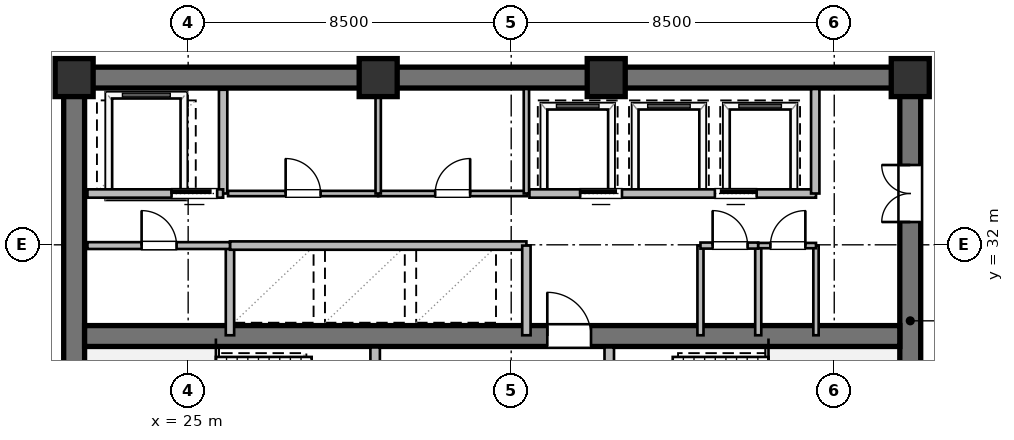
"""IFC4 building model, lengths in metres.
Left out: names, types, materials, properties, quantities, classifications, styles, units other than length and angle.
Written with IfcOpenShell. Run it as: python <this file> out.ifc"""

import sys

from ifc_helpers import new_model, si_unit, direction, frame, frame_2d, origin, origin_2d, place, context, subcontext, project, spatial, rectangle, extrude, element, fill, save


model = new_model("IFC4")
c1 = context("Model", 3, precision=1e-05, world=origin(), true_north=direction((0.0, 1.0)))
c2 = subcontext(c1, "Body", "Model", "MODEL_VIEW")
j1 = project(units=[si_unit("LENGTHUNIT", "METRE"), si_unit("PLANEANGLEUNIT", "RADIAN")], contexts=[c1])
p1 = place(None, origin())
s1 = spatial("IfcSite", under=j1, at=p1, CompositionType="ELEMENT")
p2 = place(p1, origin())
s2 = spatial("IfcBuilding", under=s1, at=p2, CompositionType="ELEMENT")
p3 = place(p2, frame((0.0, 0.0, 163.8)))
s3 = spatial("IfcBuildingStorey", under=s2, at=p3, CompositionType="ELEMENT", Elevation=163.8)
p4 = place(p3, frame((21.725, 36.4, 0.0), z_axis=(0.0, 0.0, 1.0), x_axis=(1.0, 0.0, 0.0)))
e1 = element("IfcWall", 1, at=p4, inside=s3, PredefinedType="SHEAR", context=c2, shape_type="SweptSolid", body=[
    extrude(rectangle(XDim=22.55, YDim=0.55, at=frame_2d((11.275, 0.0))), origin(), (0.0, 0.0, 1.0), 3.36),
])
p5 = place(p3, frame((22.0, 23.875, 0.0), z_axis=(0.0, 0.0, 1.0), x_axis=(0.0, 1.0, 0.0)))
e2 = element("IfcWall", 2, at=p5, inside=s3, PredefinedType="SHEAR", context=c2, shape_type="SweptSolid", body=[
    extrude(rectangle(XDim=12.25, YDim=0.55, at=frame_2d((6.125, 0.0))), origin(), (0.0, 0.0, 1.0), 3.36),
])
p6 = place(p3, frame((44.0, 23.875, 0.0), z_axis=(0.0, 0.0, 1.0), x_axis=(0.0, 1.0, 0.0)))
e3 = element("IfcWall", 3, at=p6, inside=s3, PredefinedType="SHEAR", context=c2, shape_type="SweptSolid", body=[
    extrude(rectangle(XDim=12.25, YDim=0.55, at=frame_2d((6.125, 0.0))), origin(), (0.0, 0.0, 1.0), 3.36),
])
p7 = place(p6, frame((8.725, 0.0, 0.0)))
e4 = element("IfcOpeningElement", 4, at=p7, cuts=e3, PredefinedType="OPENING", context=c2, shape_type="SweptSolid", body=[
    extrude(rectangle(XDim=1.5, YDim=2.15, at=frame_2d((0.75, 1.075))), frame((0.0, 0.285, 0.0), z_axis=(0.0, -1.0, 0.0), x_axis=(1.0, 0.0, 0.0)), (0.0, 0.0, 1.0), 0.57),
])
p8 = place(p3, frame((22.275, 29.6, 0.0), z_axis=(0.0, 0.0, 1.0), x_axis=(1.0, 0.0, 0.0)))
e5 = element("IfcWall", 5, at=p8, inside=s3, PredefinedType="SHEAR", context=c2, shape_type="SweptSolid", body=[
    extrude(rectangle(XDim=21.45, YDim=0.55, at=frame_2d((10.725, 0.0))), origin(), (0.0, 0.0, 1.0), 3.36),
])
p9 = place(p8, frame((12.175, 0.0, 0.0)))
e6 = element("IfcOpeningElement", 6, at=p9, cuts=e5, PredefinedType="OPENING", context=c2, shape_type="SweptSolid", body=[
    extrude(rectangle(XDim=1.15, YDim=2.1, at=frame_2d((0.575, 1.05))), frame((0.0, 0.285, 0.0), z_axis=(0.0, -1.0, 0.0), x_axis=(1.0, 0.0, 0.0)), (0.0, 0.0, 1.0), 0.57),
])
for number, where, z_axis, x_axis in (
    (7, (44.0, 36.4, 0.0), (0.0, 0.0, 1.0), (1.0, 0.0, 0.0)),
    (8, (36.0, 36.4, 0.0), (0.0, 0.0, 1.0), (1.0, 0.0, 0.0)),
    (9, (30.0, 36.4, 0.0), (0.0, 0.0, 1.0), (1.0, 0.0, 0.0)),
    (10, (22.0, 36.4, 0.0), (0.0, 0.0, 1.0), (1.0, 0.0, 0.0)),
):
    element("IfcColumn", number, at=place(p3, frame(where, z_axis=z_axis, x_axis=x_axis)), inside=s3, PredefinedType="COLUMN", context=c2, shape_type="SweptSolid", body=[
        extrude(rectangle(XDim=1.0, YDim=1.0, at=origin_2d()), origin(), (0.0, 0.0, 1.0), 3.6),
    ])
p10 = place(p3, frame((29.92, 23.9, 0.0), z_axis=(0.0, 0.0, 1.0), x_axis=(0.0, 1.0, 0.0)))
e11 = element("IfcWall", 11, at=p10, inside=s3, PredefinedType="SOLIDWALL", context=c2, shape_type="SweptSolid", body=[
    extrude(rectangle(XDim=5.4, YDim=0.25, at=frame_2d((2.7, 0.0))), origin(), (0.0, 0.0, 1.0), 2.89),
])
p11 = place(p10, frame((3.421, 0.0, 0.0)))
e12 = element("IfcOpeningElement", 12, at=p11, cuts=e11, PredefinedType="OPENING", context=c2, shape_type="SweptSolid", body=[
    extrude(rectangle(XDim=1.15, YDim=2.1, at=frame_2d((0.575, 1.05))), frame((0.0, 0.135, 0.0), z_axis=(0.0, -1.0, 0.0), x_axis=(1.0, 0.0, 0.0)), (0.0, 0.0, 1.0), 0.27),
])
p12 = place(p3, frame((36.08, 23.9, 0.0), z_axis=(0.0, 0.0, 1.0), x_axis=(0.0, 1.0, 0.0)))
e13 = element("IfcWall", 13, at=p12, inside=s3, PredefinedType="SOLIDWALL", context=c2, shape_type="SweptSolid", body=[
    extrude(rectangle(XDim=5.4, YDim=0.25, at=frame_2d((2.7, 0.0))), origin(), (0.0, 0.0, 1.0), 3.36),
])
p13 = place(p12, frame((3.421, 0.0, 0.0)))
e14 = element("IfcOpeningElement", 14, at=p13, cuts=e13, PredefinedType="OPENING", context=c2, shape_type="SweptSolid", body=[
    extrude(rectangle(XDim=1.15, YDim=2.1, at=frame_2d((0.575, 1.05))), frame((0.0, 0.135, 0.0), z_axis=(0.0, -1.0, 0.0), x_axis=(1.0, 0.0, 0.0)), (0.0, 0.0, 1.0), 0.27),
])
p14 = place(p3, frame((25.92, 33.35, 0.0), z_axis=(0.0, 0.0, 1.0), x_axis=(0.0, 1.0, 0.0)))
e15 = element("IfcWall", 15, at=p14, inside=s3, PredefinedType="SOLIDWALL", context=c2, shape_type="SweptSolid", body=[
    extrude(rectangle(XDim=2.73, YDim=0.22, at=frame_2d((1.365, 0.0))), origin(), (0.0, 0.0, 1.0), 3.36),
])
p15 = place(p3, frame((22.35, 33.35, 0.0), z_axis=(0.0, 0.0, 1.0), x_axis=(1.0, 0.0, 0.0)))
e16 = element("IfcWall", 16, at=p15, inside=s3, PredefinedType="SOLIDWALL", context=c2, shape_type="SweptSolid", body=[
    extrude(rectangle(XDim=3.57, YDim=0.22, at=frame_2d((1.785, 0.0))), origin(), (0.0, 0.0, 1.0), 3.36),
])
p16 = place(p15, frame((2.213, 0.0, 0.0)))
e17 = element("IfcOpeningElement", 17, at=p16, cuts=e16, PredefinedType="OPENING", context=c2, shape_type="SweptSolid", body=[
    extrude(rectangle(XDim=1.2, YDim=2.1, at=frame_2d((0.6, 1.05))), frame((0.0, 0.12, 0.0), z_axis=(0.0, -1.0, 0.0), x_axis=(1.0, 0.0, 0.0)), (0.0, 0.0, 1.0), 0.24),
])
p17 = place(p3, frame((26.1, 29.62, 0.0), z_axis=(0.0, 0.0, 1.0), x_axis=(0.0, 1.0, 0.0)))
e18 = element("IfcWall", 18, at=p17, inside=s3, PredefinedType="SOLIDWALL", context=c2, shape_type="SweptSolid", body=[
    extrude(rectangle(XDim=2.36, YDim=0.22, at=frame_2d((1.18, 0.0))), origin(), (0.0, 0.0, 1.0), 3.36),
])
p18 = place(p3, frame((26.1, 31.98, 0.0), z_axis=(0.0, 0.0, 1.0), x_axis=(1.0, 0.0, 0.0)))
e19 = element("IfcWall", 19, at=p18, inside=s3, PredefinedType="SOLIDWALL", context=c2, shape_type="SweptSolid", body=[
    extrude(rectangle(XDim=7.8, YDim=0.22, at=frame_2d((3.9, 0.0))), origin(), (0.0, 0.0, 1.0), 3.36),
])
p19 = place(p3, frame((33.9, 29.62, 0.0), z_axis=(0.0, 0.0, 1.0), x_axis=(0.0, 1.0, 0.0)))
e20 = element("IfcWall", 20, at=p19, inside=s3, PredefinedType="SOLIDWALL", context=c2, shape_type="SweptSolid", body=[
    extrude(rectangle(XDim=2.36, YDim=0.22, at=frame_2d((1.18, 0.0))), origin(), (0.0, 0.0, 1.0), 3.36),
])
p20 = place(p3, frame((26.05, 33.35, 0.0), z_axis=(0.0, 0.0, 1.0), x_axis=(1.0, 0.0, 0.0)))
e21 = element("IfcWall", 21, at=p20, inside=s3, PredefinedType="PARTITIONING", context=c2, shape_type="SweptSolid", body=[
    extrude(rectangle(XDim=3.95, YDim=0.14, at=frame_2d((1.975, 0.0))), origin(), (0.0, 0.0, 1.0), 3.36),
])
p21 = place(p20, frame((1.515, 0.0, 0.0)))
e22 = element("IfcOpeningElement", 22, at=p21, cuts=e21, PredefinedType="OPENING", context=c2, shape_type="SweptSolid", body=[
    extrude(rectangle(XDim=0.92, YDim=2.1, at=frame_2d((0.46, 1.05))), frame((0.0, 0.08, 0.0), z_axis=(0.0, -1.0, 0.0), x_axis=(1.0, 0.0, 0.0)), (0.0, 0.0, 1.0), 0.16),
])
p22 = place(p3, frame((30.0, 33.35, 0.0), z_axis=(0.0, 0.0, 1.0), x_axis=(1.0, 0.0, 0.0)))
e23 = element("IfcWall", 23, at=p22, inside=s3, PredefinedType="PARTITIONING", context=c2, shape_type="SweptSolid", body=[
    extrude(rectangle(XDim=3.92, YDim=0.14, at=frame_2d((1.96, 0.0))), origin(), (0.0, 0.0, 1.0), 3.36),
])
p23 = place(p22, frame((1.5, 0.0, 0.0)))
e24 = element("IfcOpeningElement", 24, at=p23, cuts=e23, PredefinedType="OPENING", context=c2, shape_type="SweptSolid", body=[
    extrude(rectangle(XDim=0.92, YDim=2.1, at=frame_2d((0.46, 1.05))), frame((0.0, 0.08, 0.0), z_axis=(0.0, -1.0, 0.0), x_axis=(1.0, 0.0, 0.0)), (0.0, 0.0, 1.0), 0.16),
])
for number, where, z_axis, x_axis in (
    (25, (30.0, 33.35, 0.0), (0.0, 0.0, 1.0), (0.0, 1.0, 0.0)),
    (26, (33.9, 33.35, 0.0), (0.0, 0.0, 1.0), (0.0, 1.0, 0.0)),
):
    element("IfcWall", number, at=place(p3, frame(where, z_axis=z_axis, x_axis=x_axis)), inside=s3, PredefinedType="PARTITIONING", context=c2, shape_type="SweptSolid", body=[
        extrude(rectangle(XDim=2.75, YDim=0.14, at=frame_2d((1.375, 0.0))), origin(), (0.0, 0.0, 1.0), 3.36),
    ])
p24 = place(p3, frame((33.98, 33.35, 0.0), z_axis=(0.0, 0.0, 1.0), x_axis=(1.0, 0.0, 0.0)))
e27 = element("IfcWall", 27, at=p24, inside=s3, PredefinedType="SOLIDWALL", context=c2, shape_type="SweptSolid", body=[
    extrude(rectangle(XDim=7.54, YDim=0.22, at=frame_2d((3.77, 0.0))), origin(), (0.0, 0.0, 1.0), 3.36),
])
p25 = place(p24, frame((1.335, 0.0, 0.0)))
e28 = element("IfcOpeningElement", 28, at=p25, cuts=e27, PredefinedType="OPENING", context=c2, shape_type="SweptSolid", body=[
    extrude(rectangle(XDim=1.1, YDim=2.1, at=frame_2d((0.55, 1.05))), frame((0.0, 0.12, 0.0), z_axis=(0.0, -1.0, 0.0), x_axis=(1.0, 0.0, 0.0)), (0.0, 0.0, 1.0), 0.24),
])
p26 = place(p24, frame((4.879, 0.0, 0.0)))
e29 = element("IfcOpeningElement", 29, at=p26, cuts=e27, PredefinedType="OPENING", context=c2, shape_type="SweptSolid", body=[
    extrude(rectangle(XDim=1.1, YDim=2.1, at=frame_2d((0.55, 1.05))), frame((0.0, 0.12, 0.0), z_axis=(0.0, -1.0, 0.0), x_axis=(1.0, 0.0, 0.0)), (0.0, 0.0, 1.0), 0.24),
])
p27 = place(p3, frame((41.5, 33.35, 0.0), z_axis=(0.0, 0.0, 1.0), x_axis=(0.0, 1.0, 0.0)))
e30 = element("IfcWall", 30, at=p27, inside=s3, PredefinedType="SOLIDWALL", context=c2, shape_type="SweptSolid", body=[
    extrude(rectangle(XDim=2.75, YDim=0.22, at=frame_2d((1.375, 0.0))), origin(), (0.0, 0.0, 1.0), 3.36),
])
p28 = place(p3, frame((22.35, 31.98, 0.0), z_axis=(0.0, 0.0, 1.0), x_axis=(1.0, 0.0, 0.0)))
e31 = element("IfcWall", 31, at=p28, inside=s3, PredefinedType="PARTITIONING", context=c2, shape_type="SweptSolid", body=[
    extrude(rectangle(XDim=3.75, YDim=0.18, at=frame_2d((1.875, 0.0))), origin(), (0.0, 0.0, 1.0), 3.36),
])
p29 = place(p28, frame((1.425, 0.0, 0.0)))
e32 = element("IfcOpeningElement", 32, at=p29, cuts=e31, PredefinedType="OPENING", context=c2, shape_type="SweptSolid", body=[
    extrude(rectangle(XDim=0.92, YDim=2.1, at=frame_2d((0.46, 1.05))), frame((0.0, 0.1, 0.0), z_axis=(0.0, -1.0, 0.0), x_axis=(1.0, 0.0, 0.0)), (0.0, 0.0, 1.0), 0.2),
])
for number, where, z_axis, x_axis in (
    (33, (38.48, 29.62, 0.0), (0.0, 0.0, 1.0), (0.0, 1.0, 0.0)),
    (34, (40.0, 29.62, 0.0), (0.0, 0.0, 1.0), (0.0, 1.0, 0.0)),
):
    element("IfcWall", number, at=place(p3, frame(where, z_axis=z_axis, x_axis=x_axis)), inside=s3, PredefinedType="PLUMBINGWALL", context=c2, shape_type="SweptSolid", body=[
        extrude(rectangle(XDim=2.36, YDim=0.16, at=frame_2d((1.18, 0.0))), origin(), (0.0, 0.0, 1.0), 3.36),
    ])
p30 = place(p3, frame((41.52, 29.62, 0.0), z_axis=(0.0, 0.0, 1.0), x_axis=(0.0, 1.0, 0.0)))
e35 = element("IfcWall", 35, at=p30, inside=s3, PredefinedType="PARTITIONING", context=c2, shape_type="SweptSolid", body=[
    extrude(rectangle(XDim=2.36, YDim=0.14, at=frame_2d((1.18, 0.0))), origin(), (0.0, 0.0, 1.0), 3.36),
])
p31 = place(p3, frame((38.48, 31.98, 0.0), z_axis=(0.0, 0.0, 1.0), x_axis=(1.0, 0.0, 0.0)))
e36 = element("IfcWall", 36, at=p31, inside=s3, PredefinedType="PLUMBINGWALL", context=c2, shape_type="SweptSolid", body=[
    extrude(rectangle(XDim=1.52, YDim=0.16, at=frame_2d((0.76, 0.0))), origin(), (0.0, 0.0, 1.0), 3.36),
])
p32 = place(p31, frame((0.32, 0.0, 0.0)))
e37 = element("IfcOpeningElement", 37, at=p32, cuts=e36, PredefinedType="OPENING", context=c2, shape_type="SweptSolid", body=[
    extrude(rectangle(XDim=0.92, YDim=2.1, at=frame_2d((0.46, 1.05))), frame((0.0, 0.09, 0.0), z_axis=(0.0, -1.0, 0.0), x_axis=(1.0, 0.0, 0.0)), (0.0, 0.0, 1.0), 0.18),
])
p33 = place(p3, frame((40.0, 31.98, 0.0), z_axis=(0.0, 0.0, 1.0), x_axis=(1.0, 0.0, 0.0)))
e38 = element("IfcWall", 38, at=p33, inside=s3, PredefinedType="PARTITIONING", context=c2, shape_type="SweptSolid", body=[
    extrude(rectangle(XDim=1.52, YDim=0.14, at=frame_2d((0.76, 0.0))), origin(), (0.0, 0.0, 1.0), 3.36),
])
p34 = place(p33, frame((0.32, 0.0, 0.0)))
e39 = element("IfcOpeningElement", 39, at=p34, cuts=e38, PredefinedType="OPENING", context=c2, shape_type="SweptSolid", body=[
    extrude(rectangle(XDim=0.92, YDim=2.1, at=frame_2d((0.46, 1.05))), frame((0.0, 0.08, 0.0), z_axis=(0.0, -1.0, 0.0), x_axis=(1.0, 0.0, 0.0)), (0.0, 0.0, 1.0), 0.16),
])
p35 = place(p9, origin())
e40 = element("IfcDoor", 40, at=p35, inside=s3, OperationType="SINGLE_SWING_LEFT", PredefinedType="DOOR", context=c2, shape_type="SweptSolid", body=[
    extrude(rectangle(XDim=1.15, YDim=2.1, at=frame_2d((0.575, 1.05))), frame((0.0, 0.025, 0.0), z_axis=(0.0, -1.0, 0.0), x_axis=(1.0, 0.0, 0.0)), (0.0, 0.0, 1.0), 0.05),
])
fill(e6, e40)
p36 = place(p7, origin())
e41 = element("IfcDoor", 41, at=p36, inside=s3, OperationType="DOUBLE_DOOR_SINGLE_SWING", PredefinedType="DOOR", context=c2, shape_type="SweptSolid", body=[
    extrude(rectangle(XDim=1.5, YDim=2.15, at=frame_2d((0.75, 1.075))), frame((0.0, 0.025, 0.0), z_axis=(0.0, -1.0, 0.0), x_axis=(1.0, 0.0, 0.0)), (0.0, 0.0, 1.0), 0.05),
])
fill(e4, e41)
p37 = place(p16, origin())
e42 = element("IfcDoor", 42, at=p37, inside=s3, OperationType="SLIDING_TO_LEFT", PredefinedType="DOOR", context=c2, shape_type="SweptSolid", body=[
    extrude(rectangle(XDim=1.2, YDim=2.1, at=frame_2d((0.6, 1.05))), frame((0.0, 0.025, 0.0), z_axis=(0.0, -1.0, 0.0), x_axis=(1.0, 0.0, 0.0)), (0.0, 0.0, 1.0), 0.05),
])
fill(e17, e42)
p38 = place(p21, origin())
e43 = element("IfcDoor", 43, at=p38, inside=s3, OperationType="SINGLE_SWING_LEFT", PredefinedType="DOOR", context=c2, shape_type="SweptSolid", body=[
    extrude(rectangle(XDim=0.92, YDim=2.1, at=frame_2d((0.46, 1.05))), frame((0.0, 0.025, 0.0), z_axis=(0.0, -1.0, 0.0), x_axis=(1.0, 0.0, 0.0)), (0.0, 0.0, 1.0), 0.05),
])
fill(e22, e43)
p39 = place(p23, origin())
e44 = element("IfcDoor", 44, at=p39, inside=s3, OperationType="SINGLE_SWING_RIGHT", PredefinedType="DOOR", context=c2, shape_type="SweptSolid", body=[
    extrude(rectangle(XDim=0.92, YDim=2.1, at=frame_2d((0.46, 1.05))), frame((0.0, 0.025, 0.0), z_axis=(0.0, -1.0, 0.0), x_axis=(1.0, 0.0, 0.0)), (0.0, 0.0, 1.0), 0.05),
])
fill(e24, e44)
p40 = place(p25, origin())
e45 = element("IfcDoor", 45, at=p40, inside=s3, OperationType="SLIDING_TO_LEFT", PredefinedType="DOOR", context=c2, shape_type="SweptSolid", body=[
    extrude(rectangle(XDim=1.1, YDim=2.1, at=frame_2d((0.55, 1.05))), frame((0.0, 0.025, 0.0), z_axis=(0.0, -1.0, 0.0), x_axis=(1.0, 0.0, 0.0)), (0.0, 0.0, 1.0), 0.05),
])
fill(e28, e45)
p41 = place(p26, origin())
e46 = element("IfcDoor", 46, at=p41, inside=s3, OperationType="SLIDING_TO_RIGHT", PredefinedType="DOOR", context=c2, shape_type="SweptSolid", body=[
    extrude(rectangle(XDim=1.1, YDim=2.1, at=frame_2d((0.55, 1.05))), frame((0.0, 0.025, 0.0), z_axis=(0.0, -1.0, 0.0), x_axis=(1.0, 0.0, 0.0)), (0.0, 0.0, 1.0), 0.05),
])
fill(e29, e46)
p42 = place(p29, origin())
e47 = element("IfcDoor", 47, at=p42, inside=s3, OperationType="SINGLE_SWING_LEFT", PredefinedType="DOOR", context=c2, shape_type="SweptSolid", body=[
    extrude(rectangle(XDim=0.92, YDim=2.1, at=frame_2d((0.46, 1.05))), frame((0.0, 0.025, 0.0), z_axis=(0.0, -1.0, 0.0), x_axis=(1.0, 0.0, 0.0)), (0.0, 0.0, 1.0), 0.05),
])
fill(e32, e47)
p43 = place(p32, origin())
e48 = element("IfcDoor", 48, at=p43, inside=s3, OperationType="SINGLE_SWING_LEFT", PredefinedType="DOOR", context=c2, shape_type="SweptSolid", body=[
    extrude(rectangle(XDim=0.92, YDim=2.1, at=frame_2d((0.46, 1.05))), frame((0.0, 0.025, 0.0), z_axis=(0.0, -1.0, 0.0), x_axis=(1.0, 0.0, 0.0)), (0.0, 0.0, 1.0), 0.05),
])
fill(e37, e48)
p44 = place(p34, origin())
e49 = element("IfcDoor", 49, at=p44, inside=s3, OperationType="SINGLE_SWING_RIGHT", PredefinedType="DOOR", context=c2, shape_type="SweptSolid", body=[
    extrude(rectangle(XDim=0.92, YDim=2.1, at=frame_2d((0.46, 1.05))), frame((0.0, 0.025, 0.0), z_axis=(0.0, -1.0, 0.0), x_axis=(1.0, 0.0, 0.0)), (0.0, 0.0, 1.0), 0.05),
])
fill(e39, e49)
save(model, sys.argv[1])
